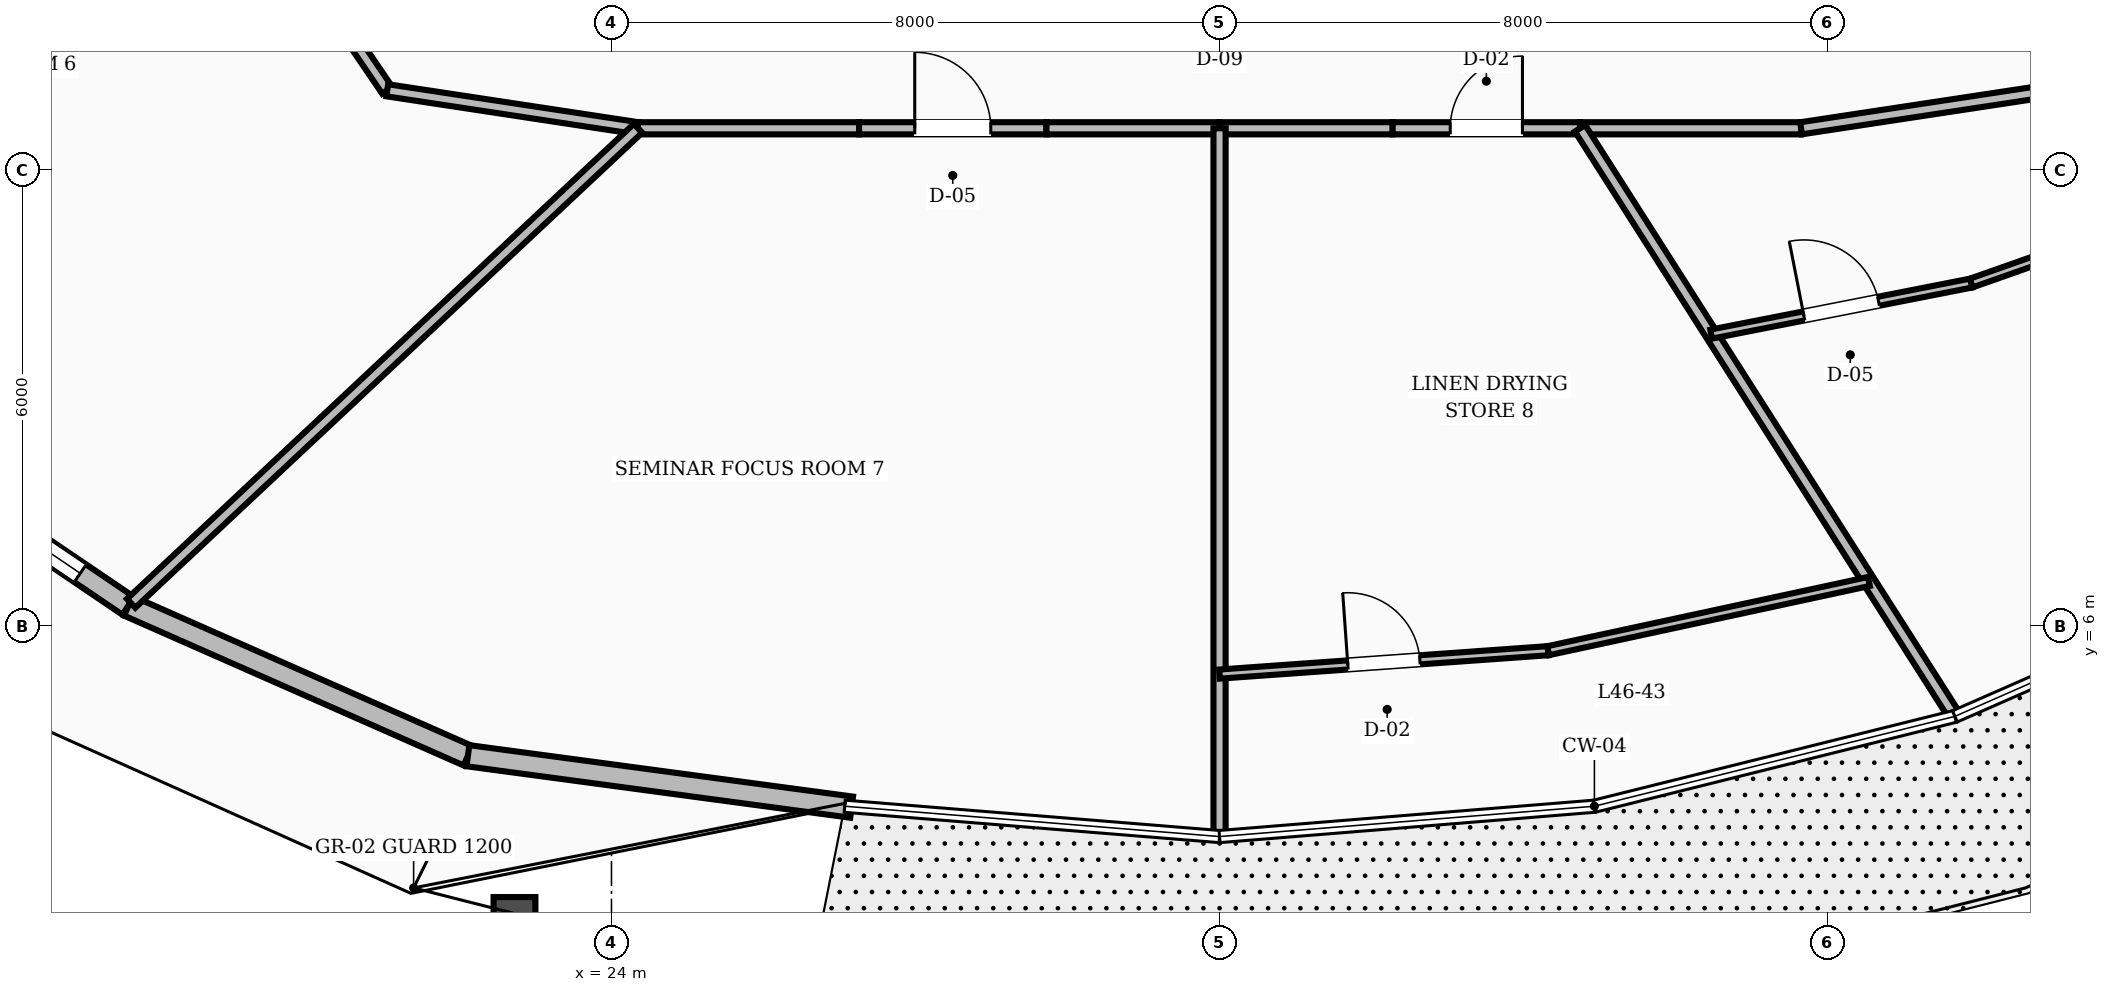
"""IFC4 building model, lengths in metres.
Left out: names, types, materials, properties, quantities, classifications, styles, units other than length and angle.
Written with IfcOpenShell. Run it as: python <this file> out.ifc"""

import sys

from ifc_helpers import new_model, si_unit, direction, frame, frame_2d, origin, place, context, subcontext, project, spatial, rectangle, extrude, element, fill, save


model = new_model("IFC4")
c1 = context("Model", 3, precision=1e-05, world=origin(), true_north=direction((0.0, 1.0)))
c2 = subcontext(c1, "Body", "Model", "MODEL_VIEW")
j1 = project(units=[si_unit("LENGTHUNIT", "METRE"), si_unit("PLANEANGLEUNIT", "RADIAN")], contexts=[c1])
p1 = place(None, origin())
s1 = spatial("IfcSite", under=j1, at=p1, CompositionType="ELEMENT")
p2 = place(p1, origin())
s2 = spatial("IfcBuilding", under=s1, at=p2, CompositionType="ELEMENT")
p3 = place(p2, frame((0.0, 0.0, 178.4)))
s3 = spatial("IfcBuildingStorey", under=s2, at=p3, CompositionType="ELEMENT", Elevation=178.4)
p4 = place(p3, frame((13.729, 8.919, 0.0), z_axis=(0.0, 0.0, 1.0), x_axis=(0.827929515697, -0.560832164767, 0.0)))
e1 = element("IfcWall", 1, at=p4, inside=s3, PredefinedType="STANDARD", context=c2, shape_type="SweptSolid", body=[
    extrude(rectangle(XDim=4.729, YDim=0.28, at=frame_2d((2.365, 0.0))), origin(), (0.0, 0.0, 1.0), 2.82),
])
p5 = place(p4, frame((0.765, 0.0, 0.8)))
e2 = element("IfcOpeningElement", 2, at=p5, cuts=e1, PredefinedType="OPENING", context=c2, shape_type="SweptSolid", body=[
    extrude(rectangle(XDim=3.2, YDim=1.65, at=frame_2d((1.6, 0.825))), frame((0.0, 0.15, 0.0), z_axis=(0.0, -1.0, 0.0), x_axis=(1.0, 0.0, 0.0)), (0.0, 0.0, 1.0), 0.3),
])
p6 = place(p3, frame((17.644, 6.267, 0.0), z_axis=(0.0, 0.0, 1.0), x_axis=(0.914919430765, -0.40363651372, 0.0)))
e3 = element("IfcWall", 3, at=p6, inside=s3, PredefinedType="STANDARD", context=c2, shape_type="SweptSolid", body=[
    extrude(rectangle(XDim=4.883, YDim=0.28, at=frame_2d((2.441, 0.0))), origin(), (0.0, 0.0, 1.0), 2.82),
])
p7 = place(p3, frame((22.112, 4.296, 0.0), z_axis=(0.0, 0.0, 1.0), x_axis=(0.99113134162, -0.132885904666, 0.0)))
e4 = element("IfcWall", 4, at=p7, inside=s3, PredefinedType="STANDARD", context=c2, shape_type="SweptSolid", body=[
    extrude(rectangle(XDim=5.093, YDim=0.28, at=frame_2d((2.546, 0.0))), origin(), (0.0, 0.0, 1.0), 2.82),
])
p8 = place(p3, frame((19.35, 15.548, 0.0), z_axis=(0.0, 0.0, 1.0), x_axis=(0.562674669208, -0.826678423955, 0.0)))
e5 = element("IfcWall", 5, at=p8, inside=s3, PredefinedType="SOLIDWALL", context=c2, shape_type="SweptSolid", body=[
    extrude(rectangle(XDim=3.021, YDim=0.16, at=frame_2d((1.511, 0.0))), origin(), (0.0, 0.0, 1.0), 2.8),
])
p9 = place(p8, frame((1.01, 0.0, 0.0)))
e6 = element("IfcOpeningElement", 6, at=p9, cuts=e5, PredefinedType="OPENING", context=c2, shape_type="SweptSolid", body=[
    extrude(rectangle(XDim=1.0, YDim=2.1, at=frame_2d((0.5, 1.05))), frame((0.0, 0.09, 0.0), z_axis=(0.0, -1.0, 0.0), x_axis=(1.0, 0.0, 0.0)), (0.0, 0.0, 1.0), 0.18),
])
p10 = place(p3, frame((21.05, 13.05, 0.0), z_axis=(0.0, 0.0, 1.0), x_axis=(0.988710906508, -0.149835721217, 0.0)))
e7 = element("IfcWall", 7, at=p10, inside=s3, PredefinedType="SOLIDWALL", context=c2, shape_type="SweptSolid", body=[
    extrude(rectangle(XDim=3.337, YDim=0.16, at=frame_2d((1.668, 0.0))), origin(), (0.0, 0.0, 1.0), 2.8),
])
p11 = place(p3, frame((24.349, 12.55, 0.0), z_axis=(0.0, 0.0, 1.0), x_axis=(1.0, 0.0, 0.0)))
e8 = element("IfcWall", 8, at=p11, inside=s3, PredefinedType="SOLIDWALL", context=c2, shape_type="SweptSolid", body=[
    extrude(rectangle(XDim=2.908, YDim=0.16, at=frame_2d((1.454, 0.0))), origin(), (0.0, 0.0, 1.0), 2.8),
])
p12 = place(p3, frame((27.257, 12.55, 0.0), z_axis=(0.0, 0.0, 1.0), x_axis=(1.0, 0.0, 0.0)))
e9 = element("IfcWall", 9, at=p12, inside=s3, PredefinedType="SOLIDWALL", context=c2, shape_type="SweptSolid", body=[
    extrude(rectangle(XDim=2.465, YDim=0.16, at=frame_2d((1.232, 0.0))), origin(), (0.0, 0.0, 1.0), 2.8),
])
p13 = place(p12, frame((0.733, 0.0, 0.0)))
e10 = element("IfcOpeningElement", 10, at=p13, cuts=e9, PredefinedType="OPENING", context=c2, shape_type="SweptSolid", body=[
    extrude(rectangle(XDim=1.0, YDim=2.1, at=frame_2d((0.5, 1.05))), frame((0.0, 0.09, 0.0), z_axis=(0.0, -1.0, 0.0), x_axis=(1.0, 0.0, 0.0)), (0.0, 0.0, 1.0), 0.18),
])
for number, where, z_axis, x_axis in (
    (11, (29.722, 12.55, 0.0), (0.0, 0.0, 1.0), (1.0, 0.0, 0.0)),
    (12, (32.0, 12.55, 0.0), (0.0, 0.0, 1.0), (1.0, 0.0, 0.0)),
):
    element("IfcWall", number, at=place(p3, frame(where, z_axis=z_axis, x_axis=x_axis)), inside=s3, PredefinedType="SOLIDWALL", context=c2, shape_type="SweptSolid", body=[
        extrude(rectangle(XDim=2.278, YDim=0.16, at=frame_2d((1.139, 0.0))), origin(), (0.0, 0.0, 1.0), 2.8),
    ])
p14 = place(p3, frame((34.278, 12.55, 0.0), z_axis=(0.0, 0.0, 1.0), x_axis=(1.0, 0.0, 0.0)))
e13 = element("IfcWall", 13, at=p14, inside=s3, PredefinedType="SOLIDWALL", context=c2, shape_type="SweptSolid", body=[
    extrude(rectangle(XDim=2.465, YDim=0.16, at=frame_2d((1.232, 0.0))), origin(), (0.0, 0.0, 1.0), 2.8),
])
p15 = place(p14, frame((0.758, 0.0, 0.0)))
e14 = element("IfcOpeningElement", 14, at=p15, cuts=e13, PredefinedType="OPENING", context=c2, shape_type="SweptSolid", body=[
    extrude(rectangle(XDim=0.95, YDim=2.1, at=frame_2d((0.475, 1.05))), frame((0.0, 0.09, 0.0), z_axis=(0.0, -1.0, 0.0), x_axis=(1.0, 0.0, 0.0)), (0.0, 0.0, 1.0), 0.18),
])
p16 = place(p3, frame((36.743, 12.55, 0.0), z_axis=(0.0, 0.0, 1.0), x_axis=(1.0, 0.0, 0.0)))
e15 = element("IfcWall", 15, at=p16, inside=s3, PredefinedType="SOLIDWALL", context=c2, shape_type="SweptSolid", body=[
    extrude(rectangle(XDim=2.908, YDim=0.16, at=frame_2d((1.454, 0.0))), origin(), (0.0, 0.0, 1.0), 2.8),
])
p17 = place(p3, frame((39.651, 12.55, 0.0), z_axis=(0.0, 0.0, 1.0), x_axis=(0.988710906508, 0.149835721217, 0.0)))
e16 = element("IfcWall", 16, at=p17, inside=s3, PredefinedType="SOLIDWALL", context=c2, shape_type="SweptSolid", body=[
    extrude(rectangle(XDim=3.337, YDim=0.16, at=frame_2d((1.668, 0.0))), origin(), (0.0, 0.0, 1.0), 2.8),
])
p18 = place(p3, frame((36.743, 12.55, 0.0), z_axis=(0.0, 0.0, 1.0), x_axis=(0.537486473019, -0.84327237078, 0.0)))
e17 = element("IfcWall", 17, at=p18, inside=s3, PredefinedType="SOLIDWALL", context=c2, shape_type="SweptSolid", body=[
    extrude(rectangle(XDim=9.125, YDim=0.16, at=frame_2d((4.562, 0.0))), origin(), (0.0, 0.0, 1.0), 2.8),
])
p19 = place(p3, frame((38.469, 9.842, 0.0), z_axis=(0.0, 0.0, 1.0), x_axis=(0.981253788754, 0.192720009485, 0.0)))
e18 = element("IfcWall", 18, at=p19, inside=s3, PredefinedType="PARTITIONING", context=c2, shape_type="SweptSolid", body=[
    extrude(rectangle(XDim=3.485, YDim=0.12, at=frame_2d((1.743, 0.0))), origin(), (0.0, 0.0, 1.0), 2.8),
])
p20 = place(p19, frame((1.243, 0.0, 0.0)))
e19 = element("IfcOpeningElement", 19, at=p20, cuts=e18, PredefinedType="OPENING", context=c2, shape_type="SweptSolid", body=[
    extrude(rectangle(XDim=1.0, YDim=2.1, at=frame_2d((0.5, 1.05))), frame((0.0, 0.07, 0.0), z_axis=(0.0, -1.0, 0.0), x_axis=(1.0, 0.0, 0.0)), (0.0, 0.0, 1.0), 0.14),
])
p21 = place(p3, frame((41.888, 10.514, 0.0), z_axis=(0.0, 0.0, 1.0), x_axis=(0.943085422762, 0.332550575664, 0.0)))
e20 = element("IfcWall", 20, at=p21, inside=s3, PredefinedType="PARTITIONING", context=c2, shape_type="SweptSolid", body=[
    extrude(rectangle(XDim=3.696, YDim=0.12, at=frame_2d((1.848, 0.0))), origin(), (0.0, 0.0, 1.0), 2.8),
])
p22 = place(p3, frame((24.349, 12.55, 0.0), z_axis=(0.0, 0.0, 1.0), x_axis=(-0.729668817256, -0.68380071448, 0.0)))
e21 = element("IfcWall", 21, at=p22, inside=s3, PredefinedType="SOLIDWALL", context=c2, shape_type="SweptSolid", body=[
    extrude(rectangle(XDim=9.139, YDim=0.16, at=frame_2d((4.569, 0.0))), origin(), (0.0, 0.0, 1.0), 2.8),
])
p23 = place(p3, frame((32.0, 12.55, 0.0), z_axis=(0.0, 0.0, 1.0), x_axis=(0.0, -1.0, 0.0)))
e22 = element("IfcWall", 22, at=p23, inside=s3, PredefinedType="SOLIDWALL", context=c2, shape_type="SweptSolid", body=[
    extrude(rectangle(XDim=9.268, YDim=0.16, at=frame_2d((4.634, 0.0))), origin(), (0.0, 0.0, 1.0), 2.8),
])
p24 = place(p3, frame((32.0, 5.37, 0.0), z_axis=(0.0, 0.0, 1.0), x_axis=(0.997477822503, 0.070978825117, 0.0)))
e23 = element("IfcWall", 23, at=p24, inside=s3, PredefinedType="PARTITIONING", context=c2, shape_type="SweptSolid", body=[
    extrude(rectangle(XDim=4.334, YDim=0.12, at=frame_2d((2.167, 0.0))), origin(), (0.0, 0.0, 1.0), 2.8),
])
p25 = place(p24, frame((1.692, 0.0, 0.0)))
e24 = element("IfcOpeningElement", 24, at=p25, cuts=e23, PredefinedType="OPENING", context=c2, shape_type="SweptSolid", body=[
    extrude(rectangle(XDim=0.95, YDim=2.1, at=frame_2d((0.475, 1.05))), frame((0.0, 0.07, 0.0), z_axis=(0.0, -1.0, 0.0), x_axis=(1.0, 0.0, 0.0)), (0.0, 0.0, 1.0), 0.14),
])
p26 = place(p3, frame((36.323, 5.677, 0.0), z_axis=(0.0, 0.0, 1.0), x_axis=(0.97749681164, 0.210950191357, 0.0)))
e25 = element("IfcWall", 25, at=p26, inside=s3, PredefinedType="PARTITIONING", context=c2, shape_type="SweptSolid", body=[
    extrude(rectangle(XDim=4.317, YDim=0.12, at=frame_2d((2.158, 0.0))), origin(), (0.0, 0.0, 1.0), 2.8),
])
p27 = place(p5, origin())
e26 = element("IfcWindow", 26, at=p27, inside=s3, PartitioningType="SINGLE_PANEL", PredefinedType="WINDOW", context=c2, shape_type="SweptSolid", body=[
    extrude(rectangle(XDim=3.2, YDim=1.65, at=frame_2d((1.6, 0.825))), frame((0.0, 0.03, 0.0), z_axis=(0.0, -1.0, 0.0), x_axis=(1.0, 0.0, 0.0)), (0.0, 0.0, 1.0), 0.06),
])
fill(e2, e26)
p28 = place(p20, origin())
e27 = element("IfcDoor", 27, at=p28, inside=s3, OperationType="SINGLE_SWING_LEFT", PredefinedType="DOOR", context=c2, shape_type="SweptSolid", body=[
    extrude(rectangle(XDim=1.0, YDim=2.1, at=frame_2d((0.5, 1.05))), frame((0.0, 0.025, 0.0), z_axis=(0.0, -1.0, 0.0), x_axis=(1.0, 0.0, 0.0)), (0.0, 0.0, 1.0), 0.05),
])
fill(e19, e27)
p29 = place(p13, origin())
e28 = element("IfcDoor", 28, at=p29, inside=s3, OperationType="SINGLE_SWING_LEFT", PredefinedType="DOOR", context=c2, shape_type="SweptSolid", body=[
    extrude(rectangle(XDim=1.0, YDim=2.1, at=frame_2d((0.5, 1.05))), frame((0.0, 0.025, 0.0), z_axis=(0.0, -1.0, 0.0), x_axis=(1.0, 0.0, 0.0)), (0.0, 0.0, 1.0), 0.05),
])
fill(e10, e28)
p30 = place(p15, origin())
e29 = element("IfcDoor", 29, at=p30, inside=s3, OperationType="SINGLE_SWING_RIGHT", PredefinedType="DOOR", context=c2, shape_type="SweptSolid", body=[
    extrude(rectangle(XDim=0.95, YDim=2.1, at=frame_2d((0.475, 1.05))), frame((0.0, 0.025, 0.0), z_axis=(0.0, -1.0, 0.0), x_axis=(1.0, 0.0, 0.0)), (0.0, 0.0, 1.0), 0.05),
])
fill(e14, e29)
p31 = place(p25, origin())
e30 = element("IfcDoor", 30, at=p31, inside=s3, OperationType="SINGLE_SWING_LEFT", PredefinedType="DOOR", context=c2, shape_type="SweptSolid", body=[
    extrude(rectangle(XDim=0.95, YDim=2.1, at=frame_2d((0.475, 1.05))), frame((0.0, 0.025, 0.0), z_axis=(0.0, -1.0, 0.0), x_axis=(1.0, 0.0, 0.0)), (0.0, 0.0, 1.0), 0.05),
])
fill(e24, e30)
save(model, sys.argv[1])
